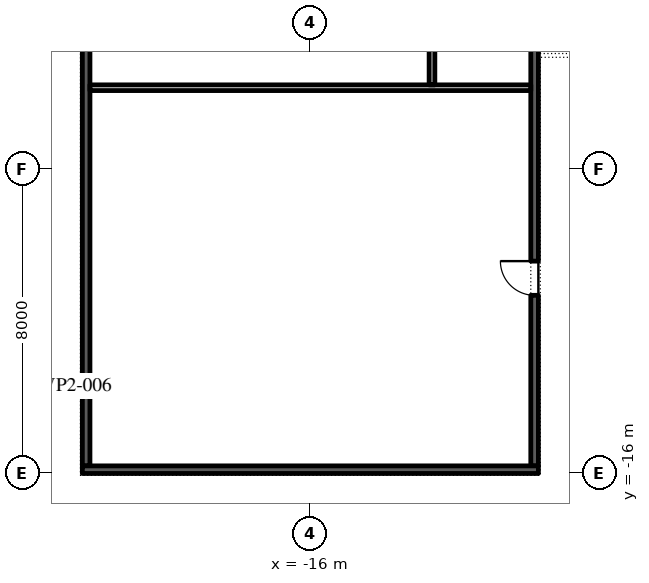
"""IFC4 building model, lengths in metres.
Left out: names, types, materials, properties, quantities, classifications, styles, units other than length and angle.
Written with IfcOpenShell. Run it as: python <this file> out.ifc"""

import sys

from ifc_helpers import new_model, si_unit, direction, frame, frame_2d, origin, place, context, subcontext, project, spatial, rectangle, extrude, element, fill, save


model = new_model("IFC4")
c1 = context("Model", 3, precision=1e-05, world=origin(), true_north=direction((0.0, 1.0)))
c2 = subcontext(c1, "Body", "Model", "MODEL_VIEW")
j1 = project(units=[si_unit("LENGTHUNIT", "METRE"), si_unit("PLANEANGLEUNIT", "RADIAN")], contexts=[c1])
p1 = place(None, origin())
s1 = spatial("IfcSite", under=j1, at=p1, CompositionType="ELEMENT")
p2 = place(p1, origin())
s2 = spatial("IfcBuilding", under=s1, at=p2, CompositionType="ELEMENT")
p3 = place(p2, frame((0.0, 0.0, 52.2)))
s3 = spatial("IfcBuildingStorey", under=s2, at=p3, CompositionType="ELEMENT", Elevation=52.2)
p4 = place(p3, frame((-21.9, -15.8, 0.0), z_axis=(0.0, 0.0, 1.0), x_axis=(0.0, 1.0, 0.0)))
e1 = element("IfcWall", 1, at=p4, inside=s3, PredefinedType="SHEAR", context=c2, shape_type="SweptSolid", body=[
    extrude(rectangle(XDim=13.05, YDim=0.2, at=frame_2d((6.525, 0.0))), origin(), (0.0, 0.0, 1.0), 4.0),
])
p5 = place(p4, frame((11.087, 0.0, 0.0)))
e2 = element("IfcOpeningElement", 2, at=p5, cuts=e1, PredefinedType="OPENING", context=c2, shape_type="SweptSolid", body=[
    extrude(rectangle(XDim=0.9, YDim=2.1, at=frame_2d((0.45, 1.05))), frame((0.0, 0.11, 0.0), z_axis=(0.0, -1.0, 0.0), x_axis=(1.0, 0.0, 0.0)), (0.0, 0.0, 1.0), 0.22),
])
p6 = place(p3, frame((-10.1, -15.8, 0.0), z_axis=(0.0, 0.0, 1.0), x_axis=(0.0, 1.0, 0.0)))
e3 = element("IfcWall", 3, at=p6, inside=s3, PredefinedType="SHEAR", context=c2, shape_type="SweptSolid", body=[
    extrude(rectangle(XDim=13.05, YDim=0.2, at=frame_2d((6.525, 0.0))), origin(), (0.0, 0.0, 1.0), 4.0),
])
p7 = place(p6, frame((4.488, 0.0, 0.0)))
e4 = element("IfcOpeningElement", 4, at=p7, cuts=e3, PredefinedType="OPENING", context=c2, shape_type="SweptSolid", body=[
    extrude(rectangle(XDim=0.9, YDim=2.1, at=frame_2d((0.45, 1.05))), frame((0.0, 0.11, 0.0), z_axis=(0.0, -1.0, 0.0), x_axis=(1.0, 0.0, 0.0)), (0.0, 0.0, 1.0), 0.22),
])
p8 = place(p6, frame((11.038, 0.0, 0.0)))
e5 = element("IfcOpeningElement", 5, at=p8, cuts=e3, PredefinedType="OPENING", context=c2, shape_type="SweptSolid", body=[
    extrude(rectangle(XDim=1.0, YDim=2.1, at=frame_2d((0.5, 1.05))), frame((0.0, 0.11, 0.0), z_axis=(0.0, -1.0, 0.0), x_axis=(1.0, 0.0, 0.0)), (0.0, 0.0, 1.0), 0.22),
])
p9 = place(p3, frame((-22.0, -15.9, 0.0), z_axis=(0.0, 0.0, 1.0), x_axis=(1.0, 0.0, 0.0)))
e6 = element("IfcWall", 6, at=p9, inside=s3, PredefinedType="SHEAR", context=c2, shape_type="SweptSolid", body=[
    extrude(rectangle(XDim=12.0, YDim=0.2, at=frame_2d((6.0, 0.0))), origin(), (0.0, 0.0, 1.0), 4.0),
])
p10 = place(p3, frame((-21.8, -5.85, 0.0), z_axis=(0.0, 0.0, 1.0), x_axis=(1.0, 0.0, 0.0)))
e7 = element("IfcWall", 7, at=p10, inside=s3, PredefinedType="PARTITIONING", context=c2, shape_type="SweptSolid", body=[
    extrude(rectangle(XDim=11.6, YDim=0.15, at=frame_2d((5.8, 0.0))), origin(), (0.0, 0.0, 1.0), 4.0),
])
p11 = place(p3, frame((-12.8, -5.775, 0.0), z_axis=(0.0, 0.0, 1.0), x_axis=(0.0, 1.0, 0.0)))
e8 = element("IfcWall", 8, at=p11, inside=s3, PredefinedType="PARTITIONING", context=c2, shape_type="SweptSolid", body=[
    extrude(rectangle(XDim=3.025, YDim=0.15, at=frame_2d((1.512, 0.0))), origin(), (0.0, 0.0, 1.0), 4.0),
])
p12 = place(p7, origin())
e9 = element("IfcDoor", 9, at=p12, inside=s3, OperationType="SINGLE_SWING_LEFT", PredefinedType="DOOR", context=c2, shape_type="SweptSolid", body=[
    extrude(rectangle(XDim=0.9, YDim=2.1, at=frame_2d((0.45, 1.05))), frame((0.0, 0.1, 0.0), z_axis=(0.0, -1.0, 0.0), x_axis=(1.0, 0.0, 0.0)), (0.0, 0.0, 1.0), 0.05),
])
fill(e4, e9)
save(model, sys.argv[1])
